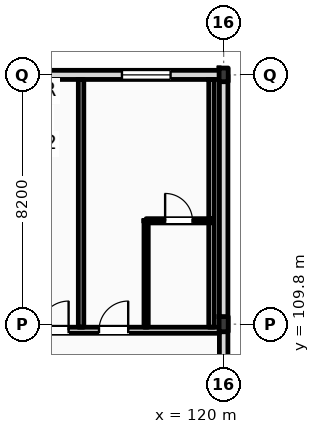
"""IFC4 building model, lengths in metres.
Left out: names, types, materials, properties, quantities, classifications, styles, units other than length and angle.
Written with IfcOpenShell. Run it as: python <this file> out.ifc"""

import sys

from ifc_helpers import new_model, si_unit, direction, frame, frame_2d, origin, origin_2d, place, context, subcontext, project, spatial, rectangle, i_section, extrude, element, fill, save


model = new_model("IFC4")
c1 = context("Model", 3, precision=1e-05, world=origin(), true_north=direction((0.0, 1.0)))
c2 = subcontext(c1, "Body", "Model", "MODEL_VIEW")
j1 = project(units=[si_unit("LENGTHUNIT", "METRE"), si_unit("PLANEANGLEUNIT", "RADIAN")], contexts=[c1])
p1 = place(None, origin())
s1 = spatial("IfcSite", under=j1, at=p1, CompositionType="ELEMENT")
p2 = place(p1, origin())
s2 = spatial("IfcBuilding", under=s1, at=p2, CompositionType="ELEMENT")
p3 = place(p2, frame((0.0, 0.0, 24.6)))
s3 = spatial("IfcBuildingStorey", under=s2, at=p3, CompositionType="ELEMENT", Elevation=24.6)
p4 = place(p3, frame((120.0, 109.8, 0.0), z_axis=(0.0, 0.0, 1.0), x_axis=(1.0, 0.0, 0.0)))
e1 = element("IfcColumn", 1, at=p4, inside=s3, PredefinedType="COLUMN", context=c2, shape_type="SweptSolid", body=[
    extrude(i_section(OverallWidth=0.3, OverallDepth=0.5, WebThickness=0.014, FlangeThickness=0.028, FilletRadius=0.027, at=origin_2d()), origin(), (0.0, 0.0, 1.0), 3.6),
])
p5 = place(p3, frame((120.0, 118.0, 0.0), z_axis=(0.0, 0.0, 1.0), x_axis=(1.0, 0.0, 0.0)))
e2 = element("IfcColumn", 2, at=p5, inside=s3, PredefinedType="COLUMN", context=c2, shape_type="SweptSolid", body=[
    extrude(i_section(OverallWidth=0.3, OverallDepth=0.45, WebThickness=0.014, FlangeThickness=0.026, FilletRadius=0.027, at=origin_2d()), origin(), (0.0, 0.0, 1.0), 3.6),
])
p6 = place(p3, frame((22.5, 118.0, 0.0), z_axis=(0.0, 0.0, 1.0), x_axis=(1.0, 0.0, 0.0)))
e3 = element("IfcWall", 3, at=p6, inside=s3, PredefinedType="STANDARD", context=c2, shape_type="SweptSolid", body=[
    extrude(rectangle(XDim=97.5, YDim=0.3, at=frame_2d((48.75, 0.0))), origin(), (0.0, 0.0, 1.0), 2.78),
])
p7 = place(p6, frame((0.91, 0.0, 0.9)))
e4 = element("IfcOpeningElement", 4, at=p7, cuts=e3, PredefinedType="OPENING", context=c2, shape_type="SweptSolid", body=[
    extrude(rectangle(XDim=0.9, YDim=1.7, at=frame_2d((0.45, 0.85))), frame((0.0, 0.16, 0.0), z_axis=(0.0, -1.0, 0.0), x_axis=(1.0, 0.0, 0.0)), (0.0, 0.0, 1.0), 0.32),
])
p8 = place(p6, frame((6.275, 0.0, 0.0)))
e5 = element("IfcOpeningElement", 5, at=p8, cuts=e3, PredefinedType="OPENING", context=c2, shape_type="SweptSolid", body=[
    extrude(rectangle(XDim=1.2, YDim=2.25, at=frame_2d((0.6, 1.125))), frame((0.0, 0.16, 0.0), z_axis=(0.0, -1.0, 0.0), x_axis=(1.0, 0.0, 0.0)), (0.0, 0.0, 1.0), 0.32),
])
p9 = place(p6, frame((11.42, 0.0, 0.9)))
e6 = element("IfcOpeningElement", 6, at=p9, cuts=e3, PredefinedType="OPENING", context=c2, shape_type="SweptSolid", body=[
    extrude(rectangle(XDim=1.35, YDim=1.7, at=frame_2d((0.675, 0.85))), frame((0.0, 0.16, 0.0), z_axis=(0.0, -1.0, 0.0), x_axis=(1.0, 0.0, 0.0)), (0.0, 0.0, 1.0), 0.32),
])
p10 = place(p6, frame((14.345, 0.0, 0.9)))
e7 = element("IfcOpeningElement", 7, at=p10, cuts=e3, PredefinedType="OPENING", context=c2, shape_type="SweptSolid", body=[
    extrude(rectangle(XDim=1.8, YDim=1.7, at=frame_2d((0.9, 0.85))), frame((0.0, 0.16, 0.0), z_axis=(0.0, -1.0, 0.0), x_axis=(1.0, 0.0, 0.0)), (0.0, 0.0, 1.0), 0.32),
])
p11 = place(p6, frame((19.27, 0.0, 0.9)))
e8 = element("IfcOpeningElement", 8, at=p11, cuts=e3, PredefinedType="OPENING", context=c2, shape_type="SweptSolid", body=[
    extrude(rectangle(XDim=1.95, YDim=1.7, at=frame_2d((0.975, 0.85))), frame((0.0, 0.16, 0.0), z_axis=(0.0, -1.0, 0.0), x_axis=(1.0, 0.0, 0.0)), (0.0, 0.0, 1.0), 0.32),
])
p12 = place(p6, frame((22.97, 0.0, 0.0)))
e9 = element("IfcOpeningElement", 9, at=p12, cuts=e3, PredefinedType="OPENING", context=c2, shape_type="SweptSolid", body=[
    extrude(rectangle(XDim=1.2, YDim=2.25, at=frame_2d((0.6, 1.125))), frame((0.0, 0.16, 0.0), z_axis=(0.0, -1.0, 0.0), x_axis=(1.0, 0.0, 0.0)), (0.0, 0.0, 1.0), 0.32),
])
p13 = place(p6, frame((26.92, 0.0, 0.9)))
e10 = element("IfcOpeningElement", 10, at=p13, cuts=e3, PredefinedType="OPENING", context=c2, shape_type="SweptSolid", body=[
    extrude(rectangle(XDim=2.25, YDim=1.7, at=frame_2d((1.125, 0.85))), frame((0.0, 0.16, 0.0), z_axis=(0.0, -1.0, 0.0), x_axis=(1.0, 0.0, 0.0)), (0.0, 0.0, 1.0), 0.32),
])
p14 = place(p6, frame((30.645, 0.0, 0.9)))
e11 = element("IfcOpeningElement", 11, at=p14, cuts=e3, PredefinedType="OPENING", context=c2, shape_type="SweptSolid", body=[
    extrude(rectangle(XDim=2.4, YDim=1.7, at=frame_2d((1.2, 0.85))), frame((0.0, 0.16, 0.0), z_axis=(0.0, -1.0, 0.0), x_axis=(1.0, 0.0, 0.0)), (0.0, 0.0, 1.0), 0.32),
])
p15 = place(p6, frame((36.71, 0.0, 0.0)))
e12 = element("IfcOpeningElement", 12, at=p15, cuts=e3, PredefinedType="OPENING", context=c2, shape_type="SweptSolid", body=[
    extrude(rectangle(XDim=1.2, YDim=2.25, at=frame_2d((0.6, 1.125))), frame((0.0, 0.16, 0.0), z_axis=(0.0, -1.0, 0.0), x_axis=(1.0, 0.0, 0.0)), (0.0, 0.0, 1.0), 0.32),
])
p16 = place(p6, frame((39.17, 0.0, 0.0)))
e13 = element("IfcOpeningElement", 13, at=p16, cuts=e3, PredefinedType="OPENING", context=c2, shape_type="SweptSolid", body=[
    extrude(rectangle(XDim=1.2, YDim=2.25, at=frame_2d((0.6, 1.125))), frame((0.0, 0.16, 0.0), z_axis=(0.0, -1.0, 0.0), x_axis=(1.0, 0.0, 0.0)), (0.0, 0.0, 1.0), 0.32),
])
p17 = place(p6, frame((43.22, 0.0, 0.9)))
e14 = element("IfcOpeningElement", 14, at=p17, cuts=e3, PredefinedType="OPENING", context=c2, shape_type="SweptSolid", body=[
    extrude(rectangle(XDim=2.85, YDim=1.7, at=frame_2d((1.425, 0.85))), frame((0.0, 0.16, 0.0), z_axis=(0.0, -1.0, 0.0), x_axis=(1.0, 0.0, 0.0)), (0.0, 0.0, 1.0), 0.32),
])
p18 = place(p6, frame((47.29, 0.0, 0.9)))
e15 = element("IfcOpeningElement", 15, at=p18, cuts=e3, PredefinedType="OPENING", context=c2, shape_type="SweptSolid", body=[
    extrude(rectangle(XDim=1.35, YDim=1.7, at=frame_2d((0.675, 0.85))), frame((0.0, 0.16, 0.0), z_axis=(0.0, -1.0, 0.0), x_axis=(1.0, 0.0, 0.0)), (0.0, 0.0, 1.0), 0.32),
])
p19 = place(p6, frame((52.91, 0.0, 0.0)))
e16 = element("IfcOpeningElement", 16, at=p19, cuts=e3, PredefinedType="OPENING", context=c2, shape_type="SweptSolid", body=[
    extrude(rectangle(XDim=1.2, YDim=2.25, at=frame_2d((0.6, 1.125))), frame((0.0, 0.16, 0.0), z_axis=(0.0, -1.0, 0.0), x_axis=(1.0, 0.0, 0.0)), (0.0, 0.0, 1.0), 0.32),
])
p20 = place(p6, frame((55.69, 0.0, 0.9)))
e17 = element("IfcOpeningElement", 17, at=p20, cuts=e3, PredefinedType="OPENING", context=c2, shape_type="SweptSolid", body=[
    extrude(rectangle(XDim=0.9, YDim=1.7, at=frame_2d((0.45, 0.85))), frame((0.0, 0.16, 0.0), z_axis=(0.0, -1.0, 0.0), x_axis=(1.0, 0.0, 0.0)), (0.0, 0.0, 1.0), 0.32),
])
p21 = place(p6, frame((59.82, 0.0, 0.9)))
e18 = element("IfcOpeningElement", 18, at=p21, cuts=e3, PredefinedType="OPENING", context=c2, shape_type="SweptSolid", body=[
    extrude(rectangle(XDim=3.25, YDim=1.7, at=frame_2d((1.625, 0.85))), frame((0.0, 0.16, 0.0), z_axis=(0.0, -1.0, 0.0), x_axis=(1.0, 0.0, 0.0)), (0.0, 0.0, 1.0), 0.32),
])
p22 = place(p6, frame((65.89, 0.0, 0.9)))
e19 = element("IfcOpeningElement", 19, at=p22, cuts=e3, PredefinedType="OPENING", context=c2, shape_type="SweptSolid", body=[
    extrude(rectangle(XDim=1.1, YDim=1.7, at=frame_2d((0.55, 0.85))), frame((0.0, 0.16, 0.0), z_axis=(0.0, -1.0, 0.0), x_axis=(1.0, 0.0, 0.0)), (0.0, 0.0, 1.0), 0.32),
])
p23 = place(p6, frame((69.245, 0.0, 0.0)))
e20 = element("IfcOpeningElement", 20, at=p23, cuts=e3, PredefinedType="OPENING", context=c2, shape_type="SweptSolid", body=[
    extrude(rectangle(XDim=1.2, YDim=2.25, at=frame_2d((0.6, 1.125))), frame((0.0, 0.16, 0.0), z_axis=(0.0, -1.0, 0.0), x_axis=(1.0, 0.0, 0.0)), (0.0, 0.0, 1.0), 0.32),
])
p24 = place(p6, frame((73.69, 0.0, 0.9)))
e21 = element("IfcOpeningElement", 21, at=p24, cuts=e3, PredefinedType="OPENING", context=c2, shape_type="SweptSolid", body=[
    extrude(rectangle(XDim=1.8, YDim=1.7, at=frame_2d((0.9, 0.85))), frame((0.0, 0.16, 0.0), z_axis=(0.0, -1.0, 0.0), x_axis=(1.0, 0.0, 0.0)), (0.0, 0.0, 1.0), 0.32),
])
p25 = place(p6, frame((76.62, 0.0, 0.9)))
e22 = element("IfcOpeningElement", 22, at=p25, cuts=e3, PredefinedType="OPENING", context=c2, shape_type="SweptSolid", body=[
    extrude(rectangle(XDim=3.25, YDim=1.7, at=frame_2d((1.625, 0.85))), frame((0.0, 0.16, 0.0), z_axis=(0.0, -1.0, 0.0), x_axis=(1.0, 0.0, 0.0)), (0.0, 0.0, 1.0), 0.32),
])
p26 = place(p6, frame((81.895, 0.0, 0.9)))
e23 = element("IfcOpeningElement", 23, at=p26, cuts=e3, PredefinedType="OPENING", context=c2, shape_type="SweptSolid", body=[
    extrude(rectangle(XDim=1.1, YDim=1.5, at=frame_2d((0.55, 0.75))), frame((0.0, 0.16, 0.0), z_axis=(0.0, -1.0, 0.0), x_axis=(1.0, 0.0, 0.0)), (0.0, 0.0, 1.0), 0.32),
])
p27 = place(p6, frame((86.02, 0.0, 0.9)))
e24 = element("IfcOpeningElement", 24, at=p27, cuts=e3, PredefinedType="OPENING", context=c2, shape_type="SweptSolid", body=[
    extrude(rectangle(XDim=1.25, YDim=1.6, at=frame_2d((0.625, 0.8))), frame((0.0, 0.16, 0.0), z_axis=(0.0, -1.0, 0.0), x_axis=(1.0, 0.0, 0.0)), (0.0, 0.0, 1.0), 0.32),
])
p28 = place(p6, frame((90.145, 0.0, 0.9)))
e25 = element("IfcOpeningElement", 25, at=p28, cuts=e3, PredefinedType="OPENING", context=c2, shape_type="SweptSolid", body=[
    extrude(rectangle(XDim=1.4, YDim=1.7, at=frame_2d((0.7, 0.85))), frame((0.0, 0.16, 0.0), z_axis=(0.0, -1.0, 0.0), x_axis=(1.0, 0.0, 0.0)), (0.0, 0.0, 1.0), 0.32),
])
p29 = place(p6, frame((94.155, 0.0, 0.9)))
e26 = element("IfcOpeningElement", 26, at=p29, cuts=e3, PredefinedType="OPENING", context=c2, shape_type="SweptSolid", body=[
    extrude(rectangle(XDim=1.6, YDim=1.7, at=frame_2d((0.8, 0.85))), frame((0.0, 0.16, 0.0), z_axis=(0.0, -1.0, 0.0), x_axis=(1.0, 0.0, 0.0)), (0.0, 0.0, 1.0), 0.32),
])
p30 = place(p3, frame((120.0, 96.0, 0.0), z_axis=(0.0, 0.0, 1.0), x_axis=(0.0, 1.0, 0.0)))
e27 = element("IfcWall", 27, at=p30, inside=s3, PredefinedType="STANDARD", context=c2, shape_type="SweptSolid", body=[
    extrude(rectangle(XDim=22.0, YDim=0.28, at=frame_2d((11.0, 0.0))), origin(), (0.0, 0.0, 1.0), 2.93),
])
p31 = place(p3, frame((10.65, 109.6, 0.0), z_axis=(0.0, 0.0, 1.0), x_axis=(1.0, 0.0, 0.0)))
e28 = element("IfcWall", 28, at=p31, inside=s3, PredefinedType="PARTITIONING", context=c2, shape_type="SweptSolid", body=[
    extrude(rectangle(XDim=109.21, YDim=0.2, at=frame_2d((54.605, 0.0))), origin(), (0.0, 0.0, 1.0), 2.78),
])
p32 = place(p31, frame((12.705, 0.0, 0.0)))
e29 = element("IfcOpeningElement", 29, at=p32, cuts=e28, PredefinedType="OPENING", context=c2, shape_type="SweptSolid", body=[
    extrude(rectangle(XDim=1.02, YDim=2.2, at=frame_2d((0.51, 1.1))), frame((0.0, 0.11, 0.0), z_axis=(0.0, -1.0, 0.0), x_axis=(1.0, 0.0, 0.0)), (0.0, 0.0, 1.0), 0.22),
])
p33 = place(p31, frame((19.26, 0.0, 0.0)))
e30 = element("IfcOpeningElement", 30, at=p33, cuts=e28, PredefinedType="OPENING", context=c2, shape_type="SweptSolid", body=[
    extrude(rectangle(XDim=1.02, YDim=2.2, at=frame_2d((0.51, 1.1))), frame((0.0, 0.11, 0.0), z_axis=(0.0, -1.0, 0.0), x_axis=(1.0, 0.0, 0.0)), (0.0, 0.0, 1.0), 0.22),
])
p34 = place(p31, frame((23.71, 0.0, 0.0)))
e31 = element("IfcOpeningElement", 31, at=p34, cuts=e28, PredefinedType="OPENING", context=c2, shape_type="SweptSolid", body=[
    extrude(rectangle(XDim=1.02, YDim=2.2, at=frame_2d((0.51, 1.1))), frame((0.0, 0.11, 0.0), z_axis=(0.0, -1.0, 0.0), x_axis=(1.0, 0.0, 0.0)), (0.0, 0.0, 1.0), 0.22),
])
p35 = place(p31, frame((27.66, 0.0, 0.0)))
e32 = element("IfcOpeningElement", 32, at=p35, cuts=e28, PredefinedType="OPENING", context=c2, shape_type="SweptSolid", body=[
    extrude(rectangle(XDim=1.02, YDim=2.2, at=frame_2d((0.51, 1.1))), frame((0.0, 0.11, 0.0), z_axis=(0.0, -1.0, 0.0), x_axis=(1.0, 0.0, 0.0)), (0.0, 0.0, 1.0), 0.22),
])
p36 = place(p31, frame((31.89, 0.0, 0.0)))
e33 = element("IfcOpeningElement", 33, at=p36, cuts=e28, PredefinedType="OPENING", context=c2, shape_type="SweptSolid", body=[
    extrude(rectangle(XDim=0.96, YDim=2.2, at=frame_2d((0.48, 1.1))), frame((0.0, 0.11, 0.0), z_axis=(0.0, -1.0, 0.0), x_axis=(1.0, 0.0, 0.0)), (0.0, 0.0, 1.0), 0.22),
])
p37 = place(p31, frame((33.94, 0.0, 0.0)))
e34 = element("IfcOpeningElement", 34, at=p37, cuts=e28, PredefinedType="OPENING", context=c2, shape_type="SweptSolid", body=[
    extrude(rectangle(XDim=0.96, YDim=2.2, at=frame_2d((0.48, 1.1))), frame((0.0, 0.11, 0.0), z_axis=(0.0, -1.0, 0.0), x_axis=(1.0, 0.0, 0.0)), (0.0, 0.0, 1.0), 0.22),
])
p38 = place(p31, frame((40.29, 0.0, 0.0)))
e35 = element("IfcOpeningElement", 35, at=p38, cuts=e28, PredefinedType="OPENING", context=c2, shape_type="SweptSolid", body=[
    extrude(rectangle(XDim=0.96, YDim=2.2, at=frame_2d((0.48, 1.1))), frame((0.0, 0.11, 0.0), z_axis=(0.0, -1.0, 0.0), x_axis=(1.0, 0.0, 0.0)), (0.0, 0.0, 1.0), 0.22),
])
p39 = place(p31, frame((42.34, 0.0, 0.0)))
e36 = element("IfcOpeningElement", 36, at=p39, cuts=e28, PredefinedType="OPENING", context=c2, shape_type="SweptSolid", body=[
    extrude(rectangle(XDim=0.96, YDim=2.2, at=frame_2d((0.48, 1.1))), frame((0.0, 0.11, 0.0), z_axis=(0.0, -1.0, 0.0), x_axis=(1.0, 0.0, 0.0)), (0.0, 0.0, 1.0), 0.22),
])
p40 = place(p31, frame((48.69, 0.0, 0.0)))
e37 = element("IfcOpeningElement", 37, at=p40, cuts=e28, PredefinedType="OPENING", context=c2, shape_type="SweptSolid", body=[
    extrude(rectangle(XDim=0.96, YDim=2.2, at=frame_2d((0.48, 1.1))), frame((0.0, 0.11, 0.0), z_axis=(0.0, -1.0, 0.0), x_axis=(1.0, 0.0, 0.0)), (0.0, 0.0, 1.0), 0.22),
])
p41 = place(p31, frame((50.74, 0.0, 0.0)))
e38 = element("IfcOpeningElement", 38, at=p41, cuts=e28, PredefinedType="OPENING", context=c2, shape_type="SweptSolid", body=[
    extrude(rectangle(XDim=0.96, YDim=2.2, at=frame_2d((0.48, 1.1))), frame((0.0, 0.11, 0.0), z_axis=(0.0, -1.0, 0.0), x_axis=(1.0, 0.0, 0.0)), (0.0, 0.0, 1.0), 0.22),
])
p42 = place(p31, frame((57.09, 0.0, 0.0)))
e39 = element("IfcOpeningElement", 39, at=p42, cuts=e28, PredefinedType="OPENING", context=c2, shape_type="SweptSolid", body=[
    extrude(rectangle(XDim=0.96, YDim=2.2, at=frame_2d((0.48, 1.1))), frame((0.0, 0.11, 0.0), z_axis=(0.0, -1.0, 0.0), x_axis=(1.0, 0.0, 0.0)), (0.0, 0.0, 1.0), 0.22),
])
p43 = place(p31, frame((59.14, 0.0, 0.0)))
e40 = element("IfcOpeningElement", 40, at=p43, cuts=e28, PredefinedType="OPENING", context=c2, shape_type="SweptSolid", body=[
    extrude(rectangle(XDim=0.96, YDim=2.2, at=frame_2d((0.48, 1.1))), frame((0.0, 0.11, 0.0), z_axis=(0.0, -1.0, 0.0), x_axis=(1.0, 0.0, 0.0)), (0.0, 0.0, 1.0), 0.22),
])
p44 = place(p31, frame((65.49, 0.0, 0.0)))
e41 = element("IfcOpeningElement", 41, at=p44, cuts=e28, PredefinedType="OPENING", context=c2, shape_type="SweptSolid", body=[
    extrude(rectangle(XDim=0.96, YDim=2.2, at=frame_2d((0.48, 1.1))), frame((0.0, 0.11, 0.0), z_axis=(0.0, -1.0, 0.0), x_axis=(1.0, 0.0, 0.0)), (0.0, 0.0, 1.0), 0.22),
])
p45 = place(p31, frame((67.54, 0.0, 0.0)))
e42 = element("IfcOpeningElement", 42, at=p45, cuts=e28, PredefinedType="OPENING", context=c2, shape_type="SweptSolid", body=[
    extrude(rectangle(XDim=0.96, YDim=2.2, at=frame_2d((0.48, 1.1))), frame((0.0, 0.11, 0.0), z_axis=(0.0, -1.0, 0.0), x_axis=(1.0, 0.0, 0.0)), (0.0, 0.0, 1.0), 0.22),
])
p46 = place(p31, frame((73.89, 0.0, 0.0)))
e43 = element("IfcOpeningElement", 43, at=p46, cuts=e28, PredefinedType="OPENING", context=c2, shape_type="SweptSolid", body=[
    extrude(rectangle(XDim=0.96, YDim=2.2, at=frame_2d((0.48, 1.1))), frame((0.0, 0.11, 0.0), z_axis=(0.0, -1.0, 0.0), x_axis=(1.0, 0.0, 0.0)), (0.0, 0.0, 1.0), 0.22),
])
p47 = place(p31, frame((78.09, 0.0, 0.0)))
e44 = element("IfcOpeningElement", 44, at=p47, cuts=e28, PredefinedType="OPENING", context=c2, shape_type="SweptSolid", body=[
    extrude(rectangle(XDim=0.96, YDim=2.2, at=frame_2d((0.48, 1.1))), frame((0.0, 0.11, 0.0), z_axis=(0.0, -1.0, 0.0), x_axis=(1.0, 0.0, 0.0)), (0.0, 0.0, 1.0), 0.22),
])
p48 = place(p31, frame((82.29, 0.0, 0.0)))
e45 = element("IfcOpeningElement", 45, at=p48, cuts=e28, PredefinedType="OPENING", context=c2, shape_type="SweptSolid", body=[
    extrude(rectangle(XDim=0.96, YDim=2.2, at=frame_2d((0.48, 1.1))), frame((0.0, 0.11, 0.0), z_axis=(0.0, -1.0, 0.0), x_axis=(1.0, 0.0, 0.0)), (0.0, 0.0, 1.0), 0.22),
])
p49 = place(p31, frame((86.49, 0.0, 0.0)))
e46 = element("IfcOpeningElement", 46, at=p49, cuts=e28, PredefinedType="OPENING", context=c2, shape_type="SweptSolid", body=[
    extrude(rectangle(XDim=0.96, YDim=2.2, at=frame_2d((0.48, 1.1))), frame((0.0, 0.11, 0.0), z_axis=(0.0, -1.0, 0.0), x_axis=(1.0, 0.0, 0.0)), (0.0, 0.0, 1.0), 0.22),
])
p50 = place(p31, frame((88.54, 0.0, 0.0)))
e47 = element("IfcOpeningElement", 47, at=p50, cuts=e28, PredefinedType="OPENING", context=c2, shape_type="SweptSolid", body=[
    extrude(rectangle(XDim=0.96, YDim=2.2, at=frame_2d((0.48, 1.1))), frame((0.0, 0.11, 0.0), z_axis=(0.0, -1.0, 0.0), x_axis=(1.0, 0.0, 0.0)), (0.0, 0.0, 1.0), 0.22),
])
p51 = place(p31, frame((94.89, 0.0, 0.0)))
e48 = element("IfcOpeningElement", 48, at=p51, cuts=e28, PredefinedType="OPENING", context=c2, shape_type="SweptSolid", body=[
    extrude(rectangle(XDim=0.96, YDim=2.2, at=frame_2d((0.48, 1.1))), frame((0.0, 0.11, 0.0), z_axis=(0.0, -1.0, 0.0), x_axis=(1.0, 0.0, 0.0)), (0.0, 0.0, 1.0), 0.22),
])
p52 = place(p31, frame((96.94, 0.0, 0.0)))
e49 = element("IfcOpeningElement", 49, at=p52, cuts=e28, PredefinedType="OPENING", context=c2, shape_type="SweptSolid", body=[
    extrude(rectangle(XDim=0.96, YDim=2.2, at=frame_2d((0.48, 1.1))), frame((0.0, 0.11, 0.0), z_axis=(0.0, -1.0, 0.0), x_axis=(1.0, 0.0, 0.0)), (0.0, 0.0, 1.0), 0.22),
])
p53 = place(p31, frame((103.29, 0.0, 0.0)))
e50 = element("IfcOpeningElement", 50, at=p53, cuts=e28, PredefinedType="OPENING", context=c2, shape_type="SweptSolid", body=[
    extrude(rectangle(XDim=0.96, YDim=2.2, at=frame_2d((0.48, 1.1))), frame((0.0, 0.11, 0.0), z_axis=(0.0, -1.0, 0.0), x_axis=(1.0, 0.0, 0.0)), (0.0, 0.0, 1.0), 0.22),
])
p54 = place(p31, frame((105.25, 0.0, 0.0)))
e51 = element("IfcOpeningElement", 51, at=p54, cuts=e28, PredefinedType="OPENING", context=c2, shape_type="SweptSolid", body=[
    extrude(rectangle(XDim=0.96, YDim=2.2, at=frame_2d((0.48, 1.1))), frame((0.0, 0.11, 0.0), z_axis=(0.0, -1.0, 0.0), x_axis=(1.0, 0.0, 0.0)), (0.0, 0.0, 1.0), 0.22),
])
p55 = place(p31, frame((2.716, 0.0, 0.0)))
e52 = element("IfcOpeningElement", 52, at=p55, cuts=e28, PredefinedType="OPENING", context=c2, shape_type="SweptSolid", body=[
    extrude(rectangle(XDim=1.35, YDim=2.25, at=frame_2d((0.675, 1.125))), frame((0.0, 0.11, 0.0), z_axis=(0.0, -1.0, 0.0), x_axis=(1.0, 0.0, 0.0)), (0.0, 0.0, 1.0), 0.22),
])
p56 = place(p31, frame((6.65, 0.0, 0.0)))
e53 = element("IfcOpeningElement", 53, at=p56, cuts=e28, PredefinedType="OPENING", context=c2, shape_type="SweptSolid", body=[
    extrude(rectangle(XDim=1.35, YDim=2.25, at=frame_2d((0.675, 1.125))), frame((0.0, 0.11, 0.0), z_axis=(0.0, -1.0, 0.0), x_axis=(1.0, 0.0, 0.0)), (0.0, 0.0, 1.0), 0.22),
])
p57 = place(p31, frame((10.583, 0.0, 0.0)))
e54 = element("IfcOpeningElement", 54, at=p57, cuts=e28, PredefinedType="OPENING", context=c2, shape_type="SweptSolid", body=[
    extrude(rectangle(XDim=1.35, YDim=2.25, at=frame_2d((0.675, 1.125))), frame((0.0, 0.11, 0.0), z_axis=(0.0, -1.0, 0.0), x_axis=(1.0, 0.0, 0.0)), (0.0, 0.0, 1.0), 0.22),
])
for number, where, z_axis, x_axis in (
    (55, (115.31, 109.7, 0.0), (0.0, 0.0, 1.0), (0.0, 1.0, 0.0)),
    (56, (119.6, 109.7, 0.0), (0.0, 0.0, 1.0), (0.0, 1.0, 0.0)),
):
    element("IfcWall", number, at=place(p3, frame(where, z_axis=z_axis, x_axis=x_axis)), inside=s3, PredefinedType="PARTITIONING", context=c2, shape_type="SweptSolid", body=[
        extrude(rectangle(XDim=8.15, YDim=0.18, at=frame_2d((4.075, 0.0))), origin(), (0.0, 0.0, 1.0), 3.34),
    ])
p58 = place(p3, frame((117.45, 109.7, 0.0), z_axis=(0.0, 0.0, 1.0), x_axis=(0.0, 1.0, 0.0)))
e57 = element("IfcWall", 57, at=p58, inside=s3, PredefinedType="PARTITIONING", context=c2, shape_type="SweptSolid", body=[
    extrude(rectangle(XDim=3.5, YDim=0.14, at=frame_2d((1.75, 0.0))), origin(), (0.0, 0.0, 1.0), 3.34),
])
p59 = place(p3, frame((117.45, 113.2, 0.0), z_axis=(0.0, 0.0, 1.0), x_axis=(1.0, 0.0, 0.0)))
e58 = element("IfcWall", 58, at=p59, inside=s3, PredefinedType="PARTITIONING", context=c2, shape_type="SweptSolid", body=[
    extrude(rectangle(XDim=2.15, YDim=0.14, at=frame_2d((1.075, 0.0))), origin(), (0.0, 0.0, 1.0), 3.34),
])
p60 = place(p59, frame((0.625, 0.0, 0.0)))
e59 = element("IfcOpeningElement", 59, at=p60, cuts=e58, PredefinedType="OPENING", context=c2, shape_type="SweptSolid", body=[
    extrude(rectangle(XDim=0.9, YDim=2.1, at=frame_2d((0.45, 1.05))), frame((0.0, 0.08, 0.0), z_axis=(0.0, -1.0, 0.0), x_axis=(1.0, 0.0, 0.0)), (0.0, 0.0, 1.0), 0.16),
])
p61 = place(p29, origin())
e60 = element("IfcWindow", 60, at=p61, inside=s3, PartitioningType="DOUBLE_PANEL_VERTICAL", PredefinedType="WINDOW", context=c2, shape_type="SweptSolid", body=[
    extrude(rectangle(XDim=1.6, YDim=1.7, at=frame_2d((0.8, 0.85))), frame((0.0, 0.03, 0.0), z_axis=(0.0, -1.0, 0.0), x_axis=(1.0, 0.0, 0.0)), (0.0, 0.0, 1.0), 0.06),
])
fill(e26, e60)
p62 = place(p53, origin())
e61 = element("IfcDoor", 61, at=p62, inside=s3, OperationType="SINGLE_SWING_RIGHT", PredefinedType="DOOR", context=c2, shape_type="SweptSolid", body=[
    extrude(rectangle(XDim=0.96, YDim=2.2, at=frame_2d((0.48, 1.1))), frame((0.0, 0.025, 0.0), z_axis=(0.0, -1.0, 0.0), x_axis=(1.0, 0.0, 0.0)), (0.0, 0.0, 1.0), 0.05),
])
fill(e50, e61)
p63 = place(p54, origin())
e62 = element("IfcDoor", 62, at=p63, inside=s3, OperationType="SINGLE_SWING_RIGHT", PredefinedType="DOOR", context=c2, shape_type="SweptSolid", body=[
    extrude(rectangle(XDim=0.96, YDim=2.2, at=frame_2d((0.48, 1.1))), frame((0.0, 0.025, 0.0), z_axis=(0.0, -1.0, 0.0), x_axis=(1.0, 0.0, 0.0)), (0.0, 0.0, 1.0), 0.05),
])
fill(e51, e62)
p64 = place(p60, origin())
e63 = element("IfcDoor", 63, at=p64, inside=s3, OperationType="SINGLE_SWING_LEFT", PredefinedType="DOOR", context=c2, shape_type="SweptSolid", body=[
    extrude(rectangle(XDim=0.9, YDim=2.1, at=frame_2d((0.45, 1.05))), frame((0.0, 0.025, 0.0), z_axis=(0.0, -1.0, 0.0), x_axis=(1.0, 0.0, 0.0)), (0.0, 0.0, 1.0), 0.05),
])
fill(e59, e63)
save(model, sys.argv[1])
